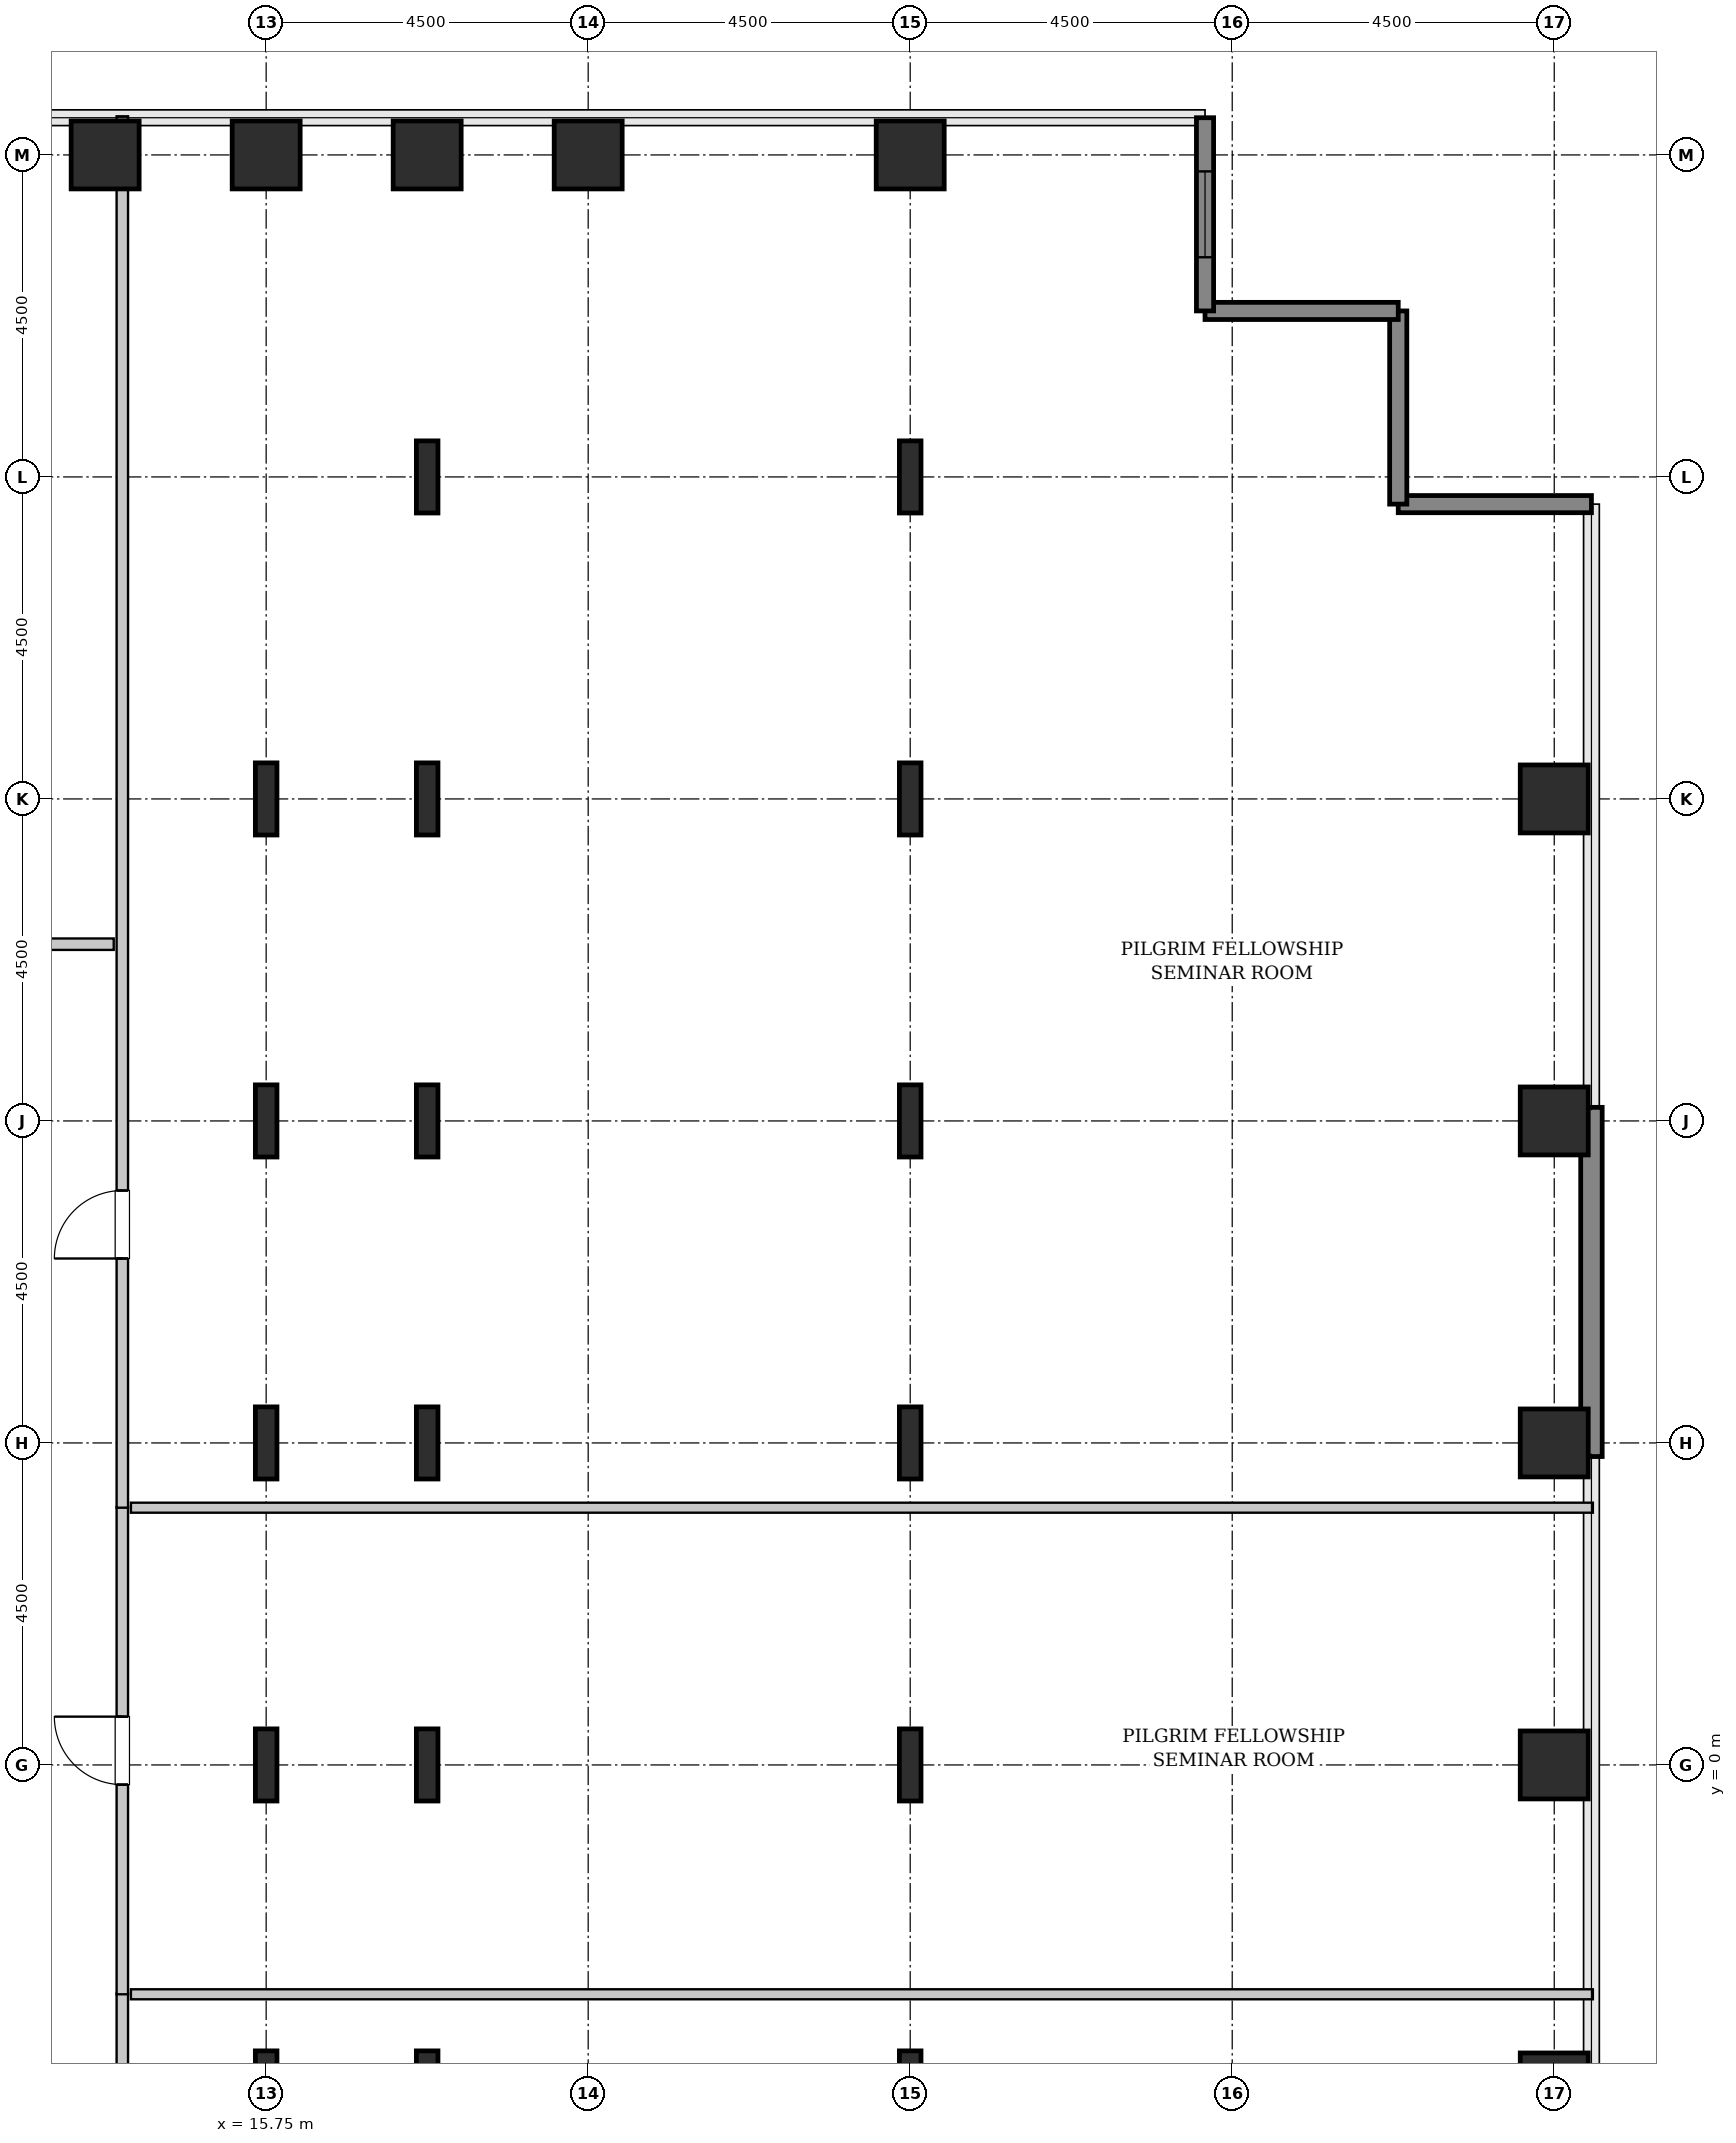
"""IFC4 building model, lengths in metres.
Left out: names, types, materials, properties, quantities, classifications, styles, units other than length and angle.
Written with IfcOpenShell. Run it as: python <this file> out.ifc"""

import sys

from ifc_helpers import new_model, si_unit, direction, frame, frame_2d, origin, origin_2d, place, context, subcontext, project, spatial, rectangle, hollow_rectangle, i_section, extrude, source, transform, mapped, element, fill, save


model = new_model("IFC4")
c1 = context("Model", 3, precision=1e-05, world=origin(), true_north=direction((0.0, 1.0)))
c2 = subcontext(c1, "Body", "Model", "MODEL_VIEW")
j1 = project(units=[si_unit("LENGTHUNIT", "METRE"), si_unit("PLANEANGLEUNIT", "RADIAN")], contexts=[c1])
p1 = place(None, origin())
s1 = spatial("IfcSite", under=j1, at=p1, CompositionType="ELEMENT")
p2 = place(p1, origin())
s2 = spatial("IfcBuilding", under=s1, at=p2, CompositionType="ELEMENT")
p3 = place(p2, frame((0.0, 0.0, 102.2)))
s3 = spatial("IfcBuildingStorey", under=s2, at=p3, CompositionType="ELEMENT", Elevation=102.2)
m1 = source(origin(), c2, "Body", "SweptSolid", [
    extrude(hollow_rectangle(XDim=0.95, YDim=0.95, WallThickness=0.045, InnerFilletRadius=0.045, OuterFilletRadius=0.09, at=origin_2d()), origin(), (0.0, 0.0, 1.0), 3.8),
])
p4 = place(p3, frame((13.5, 22.5, 0.0), z_axis=(0.0, 0.0, 1.0), x_axis=(1.0, 0.0, 0.0)))
e1 = element("IfcColumn", 1, at=p4, inside=s3, PredefinedType="COLUMN", context=c2, shape_type="MappedRepresentation", body=[
    mapped(m1, transform((0.0, 0.0, 0.0), x_axis=(1.0, 0.0, 0.0), y_axis=(0.0, 1.0, 0.0), z_axis=(0.0, 0.0, 1.0), scale=1.0)),
])
m2 = source(origin(), c2, "Body", "SweptSolid", [
    extrude(i_section(OverallWidth=0.302, OverallDepth=1.008, WebThickness=0.021, FlangeThickness=0.04, FilletRadius=0.03, at=origin_2d()), origin(), (0.0, 0.0, 1.0), 3.8),
])
for number, where, z_axis, x_axis in (
    (2, (15.75, -4.5, 0.0), (0.0, 0.0, 1.0), (1.0, 0.0, 0.0)),
    (3, (15.75, 0.0, 0.0), (0.0, 0.0, 1.0), (1.0, 0.0, 0.0)),
    (4, (15.75, 4.5, 0.0), (0.0, 0.0, 1.0), (1.0, 0.0, 0.0)),
    (5, (15.75, 9.0, 0.0), (0.0, 0.0, 1.0), (1.0, 0.0, 0.0)),
    (6, (15.75, 13.5, 0.0), (0.0, 0.0, 1.0), (1.0, 0.0, 0.0)),
):
    element("IfcColumn", number, at=place(p3, frame(where, z_axis=z_axis, x_axis=x_axis)), inside=s3, PredefinedType="COLUMN", context=c2, shape_type="MappedRepresentation", body=[
        mapped(m2, transform((0.0, 0.0, 0.0), x_axis=(1.0, 0.0, 0.0), y_axis=(0.0, 1.0, 0.0), z_axis=(0.0, 0.0, 1.0), scale=1.0)),
    ])
p5 = place(p3, frame((15.75, 22.5, 0.0), z_axis=(0.0, 0.0, 1.0), x_axis=(1.0, 0.0, 0.0)))
e7 = element("IfcColumn", 7, at=p5, inside=s3, PredefinedType="COLUMN", context=c2, shape_type="MappedRepresentation", body=[
    mapped(m1, transform((0.0, 0.0, 0.0), x_axis=(1.0, 0.0, 0.0), y_axis=(0.0, 1.0, 0.0), z_axis=(0.0, 0.0, 1.0), scale=1.0)),
])
for number, where, z_axis, x_axis in (
    (8, (18.0, -4.5, 0.0), (0.0, 0.0, 1.0), (1.0, 0.0, 0.0)),
    (9, (18.0, 0.0, 0.0), (0.0, 0.0, 1.0), (1.0, 0.0, 0.0)),
    (10, (18.0, 4.5, 0.0), (0.0, 0.0, 1.0), (1.0, 0.0, 0.0)),
    (11, (18.0, 9.0, 0.0), (0.0, 0.0, 1.0), (1.0, 0.0, 0.0)),
    (12, (18.0, 13.5, 0.0), (0.0, 0.0, 1.0), (1.0, 0.0, 0.0)),
    (13, (18.0, 18.0, 0.0), (0.0, 0.0, 1.0), (1.0, 0.0, 0.0)),
):
    element("IfcColumn", number, at=place(p3, frame(where, z_axis=z_axis, x_axis=x_axis)), inside=s3, PredefinedType="COLUMN", context=c2, shape_type="MappedRepresentation", body=[
        mapped(m2, transform((0.0, 0.0, 0.0), x_axis=(1.0, 0.0, 0.0), y_axis=(0.0, 1.0, 0.0), z_axis=(0.0, 0.0, 1.0), scale=1.0)),
    ])
for number, where, z_axis, x_axis in (
    (14, (18.0, 22.5, 0.0), (0.0, 0.0, 1.0), (1.0, 0.0, 0.0)),
    (15, (20.25, 22.5, 0.0), (0.0, 0.0, 1.0), (1.0, 0.0, 0.0)),
):
    element("IfcColumn", number, at=place(p3, frame(where, z_axis=z_axis, x_axis=x_axis)), inside=s3, PredefinedType="COLUMN", context=c2, shape_type="MappedRepresentation", body=[
        mapped(m1, transform((0.0, 0.0, 0.0), x_axis=(1.0, 0.0, 0.0), y_axis=(0.0, 1.0, 0.0), z_axis=(0.0, 0.0, 1.0), scale=1.0)),
    ])
for number, where, z_axis, x_axis in (
    (16, (24.75, -4.5, 0.0), (0.0, 0.0, 1.0), (1.0, 0.0, 0.0)),
    (17, (24.75, 0.0, 0.0), (0.0, 0.0, 1.0), (1.0, 0.0, 0.0)),
    (18, (24.75, 4.5, 0.0), (0.0, 0.0, 1.0), (1.0, 0.0, 0.0)),
    (19, (24.75, 9.0, 0.0), (0.0, 0.0, 1.0), (1.0, 0.0, 0.0)),
    (20, (24.75, 13.5, 0.0), (0.0, 0.0, 1.0), (1.0, 0.0, 0.0)),
    (21, (24.75, 18.0, 0.0), (0.0, 0.0, 1.0), (1.0, 0.0, 0.0)),
):
    element("IfcColumn", number, at=place(p3, frame(where, z_axis=z_axis, x_axis=x_axis)), inside=s3, PredefinedType="COLUMN", context=c2, shape_type="MappedRepresentation", body=[
        mapped(m2, transform((0.0, 0.0, 0.0), x_axis=(1.0, 0.0, 0.0), y_axis=(0.0, 1.0, 0.0), z_axis=(0.0, 0.0, 1.0), scale=1.0)),
    ])
for number, where, z_axis, x_axis in (
    (22, (24.75, 22.5, 0.0), (0.0, 0.0, 1.0), (1.0, 0.0, 0.0)),
    (23, (33.75, -4.5, 0.0), (0.0, 0.0, 1.0), (1.0, 0.0, 0.0)),
    (24, (33.75, 0.0, 0.0), (0.0, 0.0, 1.0), (1.0, 0.0, 0.0)),
    (25, (33.75, 4.5, 0.0), (0.0, 0.0, 1.0), (1.0, 0.0, 0.0)),
    (26, (33.75, 9.0, 0.0), (0.0, 0.0, 1.0), (1.0, 0.0, 0.0)),
    (27, (33.75, 13.5, 0.0), (0.0, 0.0, 1.0), (1.0, 0.0, 0.0)),
):
    element("IfcColumn", number, at=place(p3, frame(where, z_axis=z_axis, x_axis=x_axis)), inside=s3, PredefinedType="COLUMN", context=c2, shape_type="MappedRepresentation", body=[
        mapped(m1, transform((0.0, 0.0, 0.0), x_axis=(1.0, 0.0, 0.0), y_axis=(0.0, 1.0, 0.0), z_axis=(0.0, 0.0, 1.0), scale=1.0)),
    ])
m3 = source(origin(), c2, "Body", "SweptSolid", [
    extrude(rectangle(XDim=4.88, YDim=0.3, at=frame_2d((2.44, 0.0))), origin(), (0.0, 0.0, 1.0), 3.55),
])
p6 = place(p3, frame((34.27, 4.31, 0.0), z_axis=(0.0, 0.0, 1.0), x_axis=(0.0, 1.0, 0.0)))
e28 = element("IfcWall", 28, at=p6, inside=s3, PredefinedType="SHEAR", context=c2, shape_type="MappedRepresentation", body=[
    mapped(m3, transform((0.0, 0.0, 0.0), x_axis=(1.0, 0.0, 0.0), y_axis=(0.0, 1.0, 0.0), z_axis=(0.0, 0.0, 1.0), scale=1.0)),
])
m4 = source(origin(), c2, "Body", "SweptSolid", [
    extrude(rectangle(XDim=2.7, YDim=0.24, at=frame_2d((1.35, 0.0))), origin(), (0.0, 0.0, 1.0), 3.55),
])
for number, where, z_axis, x_axis in (
    (29, (34.27, 17.62, 0.0), (0.0, 0.0, 1.0), (-1.0, 0.0, 0.0)),
    (30, (31.57, 17.62, 0.0), (0.0, 0.0, 1.0), (0.0, 1.0, 0.0)),
    (31, (31.57, 20.32, 0.0), (0.0, 0.0, 1.0), (-1.0, 0.0, 0.0)),
):
    element("IfcWall", number, at=place(p3, frame(where, z_axis=z_axis, x_axis=x_axis)), inside=s3, PredefinedType="SHEAR", context=c2, shape_type="MappedRepresentation", body=[
        mapped(m4, transform((0.0, 0.0, 0.0), x_axis=(1.0, 0.0, 0.0), y_axis=(0.0, 1.0, 0.0), z_axis=(0.0, 0.0, 1.0), scale=1.0)),
    ])
p7 = place(p3, frame((28.87, 20.32, 0.0), z_axis=(0.0, 0.0, 1.0), x_axis=(0.0, 1.0, 0.0)))
e32 = element("IfcWall", 32, at=p7, inside=s3, PredefinedType="SHEAR", context=c2, shape_type="MappedRepresentation", body=[
    mapped(m4, transform((0.0, 0.0, 0.0), x_axis=(1.0, 0.0, 0.0), y_axis=(0.0, 1.0, 0.0), z_axis=(0.0, 0.0, 1.0), scale=1.0)),
])
p8 = place(p7, frame((0.75, 0.0, 0.85)))
e33 = element("IfcOpeningElement", 33, at=p8, cuts=e32, PredefinedType="OPENING", context=c2, shape_type="SweptSolid", body=[
    extrude(rectangle(XDim=1.2, YDim=1.8, at=frame_2d((0.6, 0.9))), frame((0.0, 0.13, 0.0), z_axis=(0.0, -1.0, 0.0), x_axis=(1.0, 0.0, 0.0)), (0.0, 0.0, 1.0), 0.26),
])
m5 = source(origin(), c2, "Body", "SweptSolid", [
    extrude(rectangle(XDim=19.845, YDim=0.16, at=frame_2d((9.922, 0.0))), origin(), (0.0, 0.0, 1.0), 3.535),
])
p9 = place(p3, frame((13.74, -23.04, 0.0), z_axis=(0.0, 0.0, 1.0), x_axis=(0.0, 1.0, 0.0)))
e34 = element("IfcWall", 34, at=p9, inside=s3, PredefinedType="PARTITIONING", context=c2, shape_type="MappedRepresentation", body=[
    mapped(m5, transform((0.0, 0.0, 0.0), x_axis=(1.0, 0.0, 0.0), y_axis=(0.0, 1.0, 0.0), z_axis=(0.0, 0.0, 1.0), scale=1.0)),
])
p10 = place(p9, frame((15.212, 0.0, 0.0)))
e35 = element("IfcOpeningElement", 35, at=p10, cuts=e34, PredefinedType="OPENING", context=c2, shape_type="SweptSolid", body=[
    extrude(rectangle(XDim=0.95, YDim=2.1, at=frame_2d((0.475, 1.05))), frame((0.0, 0.09, 0.0), z_axis=(0.0, -1.0, 0.0), x_axis=(1.0, 0.0, 0.0)), (0.0, 0.0, 1.0), 0.18),
])
m6 = source(origin(), c2, "Body", "SweptSolid", [
    extrude(rectangle(XDim=20.43, YDim=0.14, at=frame_2d((10.215, 0.0))), origin(), (0.0, 0.0, 1.0), 3.535),
])
p11 = place(p3, frame((13.86, -3.205, 0.0), z_axis=(0.0, 0.0, 1.0), x_axis=(1.0, 0.0, 0.0)))
e36 = element("IfcWall", 36, at=p11, inside=s3, PredefinedType="PARTITIONING", context=c2, shape_type="MappedRepresentation", body=[
    mapped(m6, transform((0.0, 0.0, 0.0), x_axis=(1.0, 0.0, 0.0), y_axis=(0.0, 1.0, 0.0), z_axis=(0.0, 0.0, 1.0), scale=1.0)),
])
m7 = source(origin(), c2, "Body", "SweptSolid", [
    extrude(rectangle(XDim=6.81, YDim=0.16, at=frame_2d((3.405, 0.0))), origin(), (0.0, 0.0, 1.0), 3.535),
])
p12 = place(p3, frame((13.74, -3.205, 0.0), z_axis=(0.0, 0.0, 1.0), x_axis=(0.0, 1.0, 0.0)))
e37 = element("IfcWall", 37, at=p12, inside=s3, PredefinedType="PARTITIONING", context=c2, shape_type="MappedRepresentation", body=[
    mapped(m7, transform((0.0, 0.0, 0.0), x_axis=(1.0, 0.0, 0.0), y_axis=(0.0, 1.0, 0.0), z_axis=(0.0, 0.0, 1.0), scale=1.0)),
])
p13 = place(p12, frame((2.93, 0.0, 0.0)))
e38 = element("IfcOpeningElement", 38, at=p13, cuts=e37, PredefinedType="OPENING", context=c2, shape_type="SweptSolid", body=[
    extrude(rectangle(XDim=0.95, YDim=2.1, at=frame_2d((0.475, 1.05))), frame((0.0, 0.09, 0.0), z_axis=(0.0, -1.0, 0.0), x_axis=(1.0, 0.0, 0.0)), (0.0, 0.0, 1.0), 0.18),
])
p14 = place(p3, frame((13.86, 3.595, 0.0), z_axis=(0.0, 0.0, 1.0), x_axis=(1.0, 0.0, 0.0)))
e39 = element("IfcWall", 39, at=p14, inside=s3, PredefinedType="PARTITIONING", context=c2, shape_type="MappedRepresentation", body=[
    mapped(m6, transform((0.0, 0.0, 0.0), x_axis=(1.0, 0.0, 0.0), y_axis=(0.0, 1.0, 0.0), z_axis=(0.0, 0.0, 1.0), scale=1.0)),
])
m8 = source(origin(), c2, "Body", "SweptSolid", [
    extrude(rectangle(XDim=19.445, YDim=0.16, at=frame_2d((9.723, 0.0))), origin(), (0.0, 0.0, 1.0), 3.535),
])
p15 = place(p3, frame((13.74, 3.595, 0.0), z_axis=(0.0, 0.0, 1.0), x_axis=(0.0, 1.0, 0.0)))
e40 = element("IfcWall", 40, at=p15, inside=s3, PredefinedType="PARTITIONING", context=c2, shape_type="MappedRepresentation", body=[
    mapped(m8, transform((0.0, 0.0, 0.0), x_axis=(1.0, 0.0, 0.0), y_axis=(0.0, 1.0, 0.0), z_axis=(0.0, 0.0, 1.0), scale=1.0)),
])
p16 = place(p15, frame((3.482, 0.0, 0.0)))
e41 = element("IfcOpeningElement", 41, at=p16, cuts=e40, PredefinedType="OPENING", context=c2, shape_type="SweptSolid", body=[
    extrude(rectangle(XDim=0.95, YDim=2.1, at=frame_2d((0.475, 1.05))), frame((0.0, 0.09, 0.0), z_axis=(0.0, -1.0, 0.0), x_axis=(1.0, 0.0, 0.0)), (0.0, 0.0, 1.0), 0.18),
])
m9 = source(origin(), c2, "Body", "SweptSolid", [
    extrude(rectangle(XDim=10.46, YDim=0.16, at=frame_2d((5.23, 0.0))), origin(), (0.0, 0.0, 1.0), 3.535),
])
p17 = place(p3, frame((3.16, 11.47, 0.0), z_axis=(0.0, 0.0, 1.0), x_axis=(1.0, 0.0, 0.0)))
e42 = element("IfcWall", 42, at=p17, inside=s3, PredefinedType="PARTITIONING", context=c2, shape_type="MappedRepresentation", body=[
    mapped(m9, transform((0.0, 0.0, 0.0), x_axis=(1.0, 0.0, 0.0), y_axis=(0.0, 1.0, 0.0), z_axis=(0.0, 0.0, 1.0), scale=1.0)),
])
p18 = place(p17, frame((4.755, 0.0, 0.0)))
e43 = element("IfcOpeningElement", 43, at=p18, cuts=e42, PredefinedType="OPENING", context=c2, shape_type="SweptSolid", body=[
    extrude(rectangle(XDim=0.95, YDim=2.1, at=frame_2d((0.475, 1.05))), frame((0.0, 0.09, 0.0), z_axis=(0.0, -1.0, 0.0), x_axis=(1.0, 0.0, 0.0)), (0.0, 0.0, 1.0), 0.18),
])
m10 = source(origin(), c2, "Body", "SweptSolid", [
    extrude(rectangle(XDim=1.2, YDim=1.8, at=frame_2d((0.6, 0.9))), frame((0.0, 0.03, 0.0), z_axis=(0.0, -1.0, 0.0), x_axis=(1.0, 0.0, 0.0)), (0.0, 0.0, 1.0), 0.06),
])
p19 = place(p8, origin())
e44 = element("IfcWindow", 44, at=p19, inside=s3, PartitioningType="SINGLE_PANEL", PredefinedType="WINDOW", context=c2, shape_type="MappedRepresentation", body=[
    mapped(m10, transform((0.0, 0.0, 0.0), x_axis=(1.0, 0.0, 0.0), y_axis=(0.0, 1.0, 0.0), z_axis=(0.0, 0.0, 1.0), scale=1.0)),
])
fill(e33, e44)
m11 = source(origin(), c2, "Body", "SweptSolid", [
    extrude(rectangle(XDim=0.95, YDim=2.1, at=frame_2d((0.475, 1.05))), frame((0.0, 0.025, 0.0), z_axis=(0.0, -1.0, 0.0), x_axis=(1.0, 0.0, 0.0)), (0.0, 0.0, 1.0), 0.05),
])
p20 = place(p13, origin())
e45 = element("IfcDoor", 45, at=p20, inside=s3, OperationType="SINGLE_SWING_RIGHT", PredefinedType="DOOR", context=c2, shape_type="MappedRepresentation", body=[
    mapped(m11, transform((0.0, 0.0, 0.0), x_axis=(1.0, 0.0, 0.0), y_axis=(0.0, 1.0, 0.0), z_axis=(0.0, 0.0, 1.0), scale=1.0)),
])
fill(e38, e45)
p21 = place(p16, origin())
e46 = element("IfcDoor", 46, at=p21, inside=s3, OperationType="SINGLE_SWING_LEFT", PredefinedType="DOOR", context=c2, shape_type="MappedRepresentation", body=[
    mapped(m11, transform((0.0, 0.0, 0.0), x_axis=(1.0, 0.0, 0.0), y_axis=(0.0, 1.0, 0.0), z_axis=(0.0, 0.0, 1.0), scale=1.0)),
])
fill(e41, e46)
save(model, sys.argv[1])
